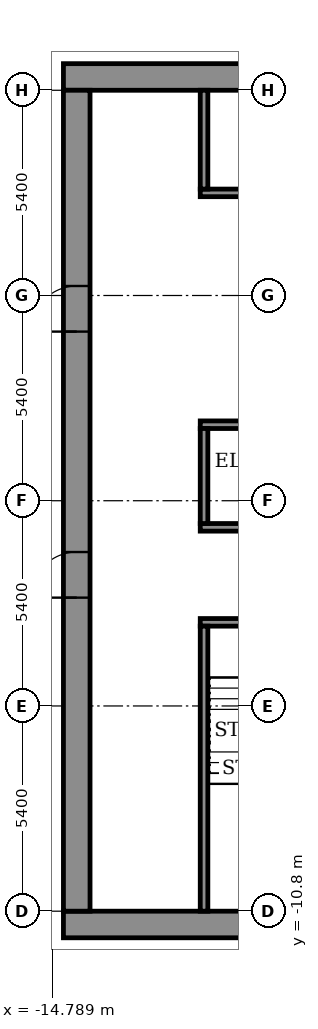
"""IFC4 building model, lengths in metres.
Left out: names, types, materials, properties, quantities, classifications, styles, units other than length and angle.
Written with IfcOpenShell. Run it as: python <this file> out.ifc"""

import sys

from ifc_helpers import new_model, si_unit, direction, frame, frame_2d, origin, place, context, subcontext, project, spatial, rectangle, extrude, element, fill, save


model = new_model("IFC4")
c1 = context("Model", 3, precision=1e-05, world=origin(), true_north=direction((0.0, 1.0)))
c2 = subcontext(c1, "Body", "Model", "MODEL_VIEW")
j1 = project(units=[si_unit("LENGTHUNIT", "METRE"), si_unit("PLANEANGLEUNIT", "RADIAN")], contexts=[c1])
p1 = place(None, origin())
s1 = spatial("IfcSite", under=j1, at=p1, CompositionType="ELEMENT")
p2 = place(p1, origin())
s2 = spatial("IfcBuilding", under=s1, at=p2, CompositionType="ELEMENT")
p3 = place(p2, frame((0.0, 0.0, 297.9)))
s3 = spatial("IfcBuildingStorey", under=s2, at=p3, CompositionType="ELEMENT", Elevation=297.9)
for number, where, z_axis, x_axis in (
    (1, (-14.5, -11.15, 0.0), (0.0, 0.0, 1.0), (1.0, 0.0, 0.0)),
    (2, (-14.5, 11.15, 0.0), (0.0, 0.0, 1.0), (1.0, 0.0, 0.0)),
):
    element("IfcWall", number, at=place(p3, frame(where, z_axis=z_axis, x_axis=x_axis)), inside=s3, PredefinedType="SHEAR", context=c2, shape_type="SweptSolid", body=[
        extrude(rectangle(XDim=29.0, YDim=0.7, at=frame_2d((14.5, 0.0))), origin(), (0.0, 0.0, 1.0), 3.6),
    ])
p4 = place(p3, frame((-14.15, -10.8, 0.0), z_axis=(0.0, 0.0, 1.0), x_axis=(0.0, 1.0, 0.0)))
e3 = element("IfcWall", 3, at=p4, inside=s3, PredefinedType="SHEAR", context=c2, shape_type="SweptSolid", body=[
    extrude(rectangle(XDim=21.6, YDim=0.7, at=frame_2d((10.8, 0.0))), origin(), (0.0, 0.0, 1.0), 3.6),
])
p5 = place(p4, frame((8.25, 0.0, 0.0)))
e4 = element("IfcOpeningElement", 4, at=p5, cuts=e3, PredefinedType="OPENING", context=c2, shape_type="SweptSolid", body=[
    extrude(rectangle(XDim=1.2, YDim=2.1, at=frame_2d((0.6, 1.05))), frame((0.0, 0.36, 0.0), z_axis=(0.0, -1.0, 0.0), x_axis=(1.0, 0.0, 0.0)), (0.0, 0.0, 1.0), 0.72),
])
p6 = place(p4, frame((15.25, 0.0, 0.0)))
e5 = element("IfcOpeningElement", 5, at=p6, cuts=e3, PredefinedType="OPENING", context=c2, shape_type="SweptSolid", body=[
    extrude(rectangle(XDim=1.2, YDim=2.1, at=frame_2d((0.6, 1.05))), frame((0.0, 0.36, 0.0), z_axis=(0.0, -1.0, 0.0), x_axis=(1.0, 0.0, 0.0)), (0.0, 0.0, 1.0), 0.72),
])
p7 = place(p3, frame((-10.9, -3.2, 0.0), z_axis=(0.0, 0.0, 1.0), x_axis=(1.0, 0.0, 0.0)))
e6 = element("IfcWall", 6, at=p7, inside=s3, PredefinedType="SHEAR", context=c2, shape_type="SweptSolid", body=[
    extrude(rectangle(XDim=21.8, YDim=0.2, at=frame_2d((10.9, 0.0))), origin(), (0.0, 0.0, 1.0), 3.05),
])
p8 = place(p7, frame((1.075, 0.0, 0.0)))
e7 = element("IfcOpeningElement", 7, at=p8, cuts=e6, PredefinedType="OPENING", context=c2, shape_type="SweptSolid", body=[
    extrude(rectangle(XDim=1.1, YDim=2.1, at=frame_2d((0.55, 1.05))), frame((0.0, 0.11, 0.0), z_axis=(0.0, -1.0, 0.0), x_axis=(1.0, 0.0, 0.0)), (0.0, 0.0, 1.0), 0.22),
])
p9 = place(p7, frame((10.325, 0.0, 0.0)))
e8 = element("IfcOpeningElement", 8, at=p9, cuts=e6, PredefinedType="OPENING", context=c2, shape_type="SweptSolid", body=[
    extrude(rectangle(XDim=1.1, YDim=2.1, at=frame_2d((0.55, 1.05))), frame((0.0, 0.11, 0.0), z_axis=(0.0, -1.0, 0.0), x_axis=(1.0, 0.0, 0.0)), (0.0, 0.0, 1.0), 0.22),
])
p10 = place(p7, frame((19.625, 0.0, 0.0)))
e9 = element("IfcOpeningElement", 9, at=p10, cuts=e6, PredefinedType="OPENING", context=c2, shape_type="SweptSolid", body=[
    extrude(rectangle(XDim=1.1, YDim=2.1, at=frame_2d((0.55, 1.05))), frame((0.0, 0.11, 0.0), z_axis=(0.0, -1.0, 0.0), x_axis=(1.0, 0.0, 0.0)), (0.0, 0.0, 1.0), 0.22),
])
p11 = place(p7, frame((5.7, 0.0, 0.0)))
e10 = element("IfcOpeningElement", 10, at=p11, cuts=e6, PredefinedType="OPENING", context=c2, shape_type="SweptSolid", body=[
    extrude(rectangle(XDim=1.1, YDim=2.1, at=frame_2d((0.55, 1.05))), frame((0.0, 0.11, 0.0), z_axis=(0.0, -1.0, 0.0), x_axis=(1.0, 0.0, 0.0)), (0.0, 0.0, 1.0), 0.22),
])
p12 = place(p7, frame((14.975, 0.0, 0.0)))
e11 = element("IfcOpeningElement", 11, at=p12, cuts=e6, PredefinedType="OPENING", context=c2, shape_type="SweptSolid", body=[
    extrude(rectangle(XDim=1.1, YDim=2.1, at=frame_2d((0.55, 1.05))), frame((0.0, 0.11, 0.0), z_axis=(0.0, -1.0, 0.0), x_axis=(1.0, 0.0, 0.0)), (0.0, 0.0, 1.0), 0.22),
])
p13 = place(p3, frame((-10.9, -0.7, 0.0), z_axis=(0.0, 0.0, 1.0), x_axis=(1.0, 0.0, 0.0)))
e12 = element("IfcWall", 12, at=p13, inside=s3, PredefinedType="SHEAR", context=c2, shape_type="SweptSolid", body=[
    extrude(rectangle(XDim=21.8, YDim=0.2, at=frame_2d((10.9, 0.0))), origin(), (0.0, 0.0, 1.0), 3.05),
])
p14 = place(p3, frame((-10.9, 2.0, 0.0), z_axis=(0.0, 0.0, 1.0), x_axis=(1.0, 0.0, 0.0)))
e13 = element("IfcWall", 13, at=p14, inside=s3, PredefinedType="SHEAR", context=c2, shape_type="SweptSolid", body=[
    extrude(rectangle(XDim=21.8, YDim=0.2, at=frame_2d((10.9, 0.0))), origin(), (0.0, 0.0, 1.0), 3.05),
])
p15 = place(p14, frame((4.95, 0.0, 0.0)))
e14 = element("IfcOpeningElement", 14, at=p15, cuts=e13, PredefinedType="OPENING", context=c2, shape_type="SweptSolid", body=[
    extrude(rectangle(XDim=1.1, YDim=2.1, at=frame_2d((0.55, 1.05))), frame((0.0, 0.11, 0.0), z_axis=(0.0, -1.0, 0.0), x_axis=(1.0, 0.0, 0.0)), (0.0, 0.0, 1.0), 0.22),
])
p16 = place(p14, frame((7.65, 0.0, 0.0)))
e15 = element("IfcOpeningElement", 15, at=p16, cuts=e13, PredefinedType="OPENING", context=c2, shape_type="SweptSolid", body=[
    extrude(rectangle(XDim=1.1, YDim=2.1, at=frame_2d((0.55, 1.05))), frame((0.0, 0.11, 0.0), z_axis=(0.0, -1.0, 0.0), x_axis=(1.0, 0.0, 0.0)), (0.0, 0.0, 1.0), 0.22),
])
p17 = place(p14, frame((10.35, 0.0, 0.0)))
e16 = element("IfcOpeningElement", 16, at=p17, cuts=e13, PredefinedType="OPENING", context=c2, shape_type="SweptSolid", body=[
    extrude(rectangle(XDim=1.1, YDim=2.1, at=frame_2d((0.55, 1.05))), frame((0.0, 0.11, 0.0), z_axis=(0.0, -1.0, 0.0), x_axis=(1.0, 0.0, 0.0)), (0.0, 0.0, 1.0), 0.22),
])
p18 = place(p14, frame((1.675, 0.0, 0.0)))
e17 = element("IfcOpeningElement", 17, at=p18, cuts=e13, PredefinedType="OPENING", context=c2, shape_type="SweptSolid", body=[
    extrude(rectangle(XDim=0.9, YDim=2.1, at=frame_2d((0.45, 1.05))), frame((0.0, 0.11, 0.0), z_axis=(0.0, -1.0, 0.0), x_axis=(1.0, 0.0, 0.0)), (0.0, 0.0, 1.0), 0.22),
])
p19 = place(p14, frame((16.525, 0.0, 0.0)))
e18 = element("IfcOpeningElement", 18, at=p19, cuts=e13, PredefinedType="OPENING", context=c2, shape_type="SweptSolid", body=[
    extrude(rectangle(XDim=0.9, YDim=2.1, at=frame_2d((0.45, 1.05))), frame((0.0, 0.11, 0.0), z_axis=(0.0, -1.0, 0.0), x_axis=(1.0, 0.0, 0.0)), (0.0, 0.0, 1.0), 0.22),
])
p20 = place(p3, frame((-10.9, 8.1, 0.0), z_axis=(0.0, 0.0, 1.0), x_axis=(1.0, 0.0, 0.0)))
e19 = element("IfcWall", 19, at=p20, inside=s3, PredefinedType="SHEAR", context=c2, shape_type="SweptSolid", body=[
    extrude(rectangle(XDim=21.8, YDim=0.2, at=frame_2d((10.9, 0.0))), origin(), (0.0, 0.0, 1.0), 3.05),
])
p21 = place(p20, frame((4.95, 0.0, 0.0)))
e20 = element("IfcOpeningElement", 20, at=p21, cuts=e19, PredefinedType="OPENING", context=c2, shape_type="SweptSolid", body=[
    extrude(rectangle(XDim=1.1, YDim=2.1, at=frame_2d((0.55, 1.05))), frame((0.0, 0.11, 0.0), z_axis=(0.0, -1.0, 0.0), x_axis=(1.0, 0.0, 0.0)), (0.0, 0.0, 1.0), 0.22),
])
p22 = place(p20, frame((7.65, 0.0, 0.0)))
e21 = element("IfcOpeningElement", 21, at=p22, cuts=e19, PredefinedType="OPENING", context=c2, shape_type="SweptSolid", body=[
    extrude(rectangle(XDim=1.1, YDim=2.1, at=frame_2d((0.55, 1.05))), frame((0.0, 0.11, 0.0), z_axis=(0.0, -1.0, 0.0), x_axis=(1.0, 0.0, 0.0)), (0.0, 0.0, 1.0), 0.22),
])
p23 = place(p20, frame((10.35, 0.0, 0.0)))
e22 = element("IfcOpeningElement", 22, at=p23, cuts=e19, PredefinedType="OPENING", context=c2, shape_type="SweptSolid", body=[
    extrude(rectangle(XDim=1.1, YDim=2.1, at=frame_2d((0.55, 1.05))), frame((0.0, 0.11, 0.0), z_axis=(0.0, -1.0, 0.0), x_axis=(1.0, 0.0, 0.0)), (0.0, 0.0, 1.0), 0.22),
])
p24 = place(p20, frame((1.675, 0.0, 0.0)))
e23 = element("IfcOpeningElement", 23, at=p24, cuts=e19, PredefinedType="OPENING", context=c2, shape_type="SweptSolid", body=[
    extrude(rectangle(XDim=0.9, YDim=2.1, at=frame_2d((0.45, 1.05))), frame((0.0, 0.11, 0.0), z_axis=(0.0, -1.0, 0.0), x_axis=(1.0, 0.0, 0.0)), (0.0, 0.0, 1.0), 0.22),
])
p25 = place(p20, frame((13.825, 0.0, 0.0)))
e24 = element("IfcOpeningElement", 24, at=p25, cuts=e19, PredefinedType="OPENING", context=c2, shape_type="SweptSolid", body=[
    extrude(rectangle(XDim=0.9, YDim=2.1, at=frame_2d((0.45, 1.05))), frame((0.0, 0.11, 0.0), z_axis=(0.0, -1.0, 0.0), x_axis=(1.0, 0.0, 0.0)), (0.0, 0.0, 1.0), 0.22),
])
p26 = place(p20, frame((18.55, 0.0, 0.0)))
e25 = element("IfcOpeningElement", 25, at=p26, cuts=e19, PredefinedType="OPENING", context=c2, shape_type="SweptSolid", body=[
    extrude(rectangle(XDim=0.9, YDim=2.1, at=frame_2d((0.45, 1.05))), frame((0.0, 0.11, 0.0), z_axis=(0.0, -1.0, 0.0), x_axis=(1.0, 0.0, 0.0)), (0.0, 0.0, 1.0), 0.22),
])
p27 = place(p3, frame((-10.8, -10.8, 0.0), z_axis=(0.0, 0.0, 1.0), x_axis=(0.0, 1.0, 0.0)))
e26 = element("IfcWall", 26, at=p27, inside=s3, PredefinedType="SHEAR", context=c2, shape_type="SweptSolid", body=[
    extrude(rectangle(XDim=7.5, YDim=0.2, at=frame_2d((3.75, 0.0))), origin(), (0.0, 0.0, 1.0), 3.05),
])
p28 = place(p3, frame((-10.8, -0.6, 0.0), z_axis=(0.0, 0.0, 1.0), x_axis=(0.0, 1.0, 0.0)))
e27 = element("IfcWall", 27, at=p28, inside=s3, PredefinedType="STANDARD", context=c2, shape_type="SweptSolid", body=[
    extrude(rectangle(XDim=2.5, YDim=0.2, at=frame_2d((1.25, 0.0))), origin(), (0.0, 0.0, 1.0), 3.05),
])
p29 = place(p3, frame((-10.8, 8.2, 0.0), z_axis=(0.0, 0.0, 1.0), x_axis=(0.0, 1.0, 0.0)))
e28 = element("IfcWall", 28, at=p29, inside=s3, PredefinedType="STANDARD", context=c2, shape_type="SweptSolid", body=[
    extrude(rectangle(XDim=2.6, YDim=0.2, at=frame_2d((1.3, 0.0))), origin(), (0.0, 0.0, 1.0), 3.05),
])
p30 = place(p5, origin())
e29 = element("IfcDoor", 29, at=p30, inside=s3, OperationType="DOUBLE_DOOR_SINGLE_SWING", PredefinedType="DOOR", context=c2, shape_type="SweptSolid", body=[
    extrude(rectangle(XDim=1.2, YDim=2.1, at=frame_2d((0.6, 1.05))), frame((0.0, 0.025, 0.0), z_axis=(0.0, -1.0, 0.0), x_axis=(1.0, 0.0, 0.0)), (0.0, 0.0, 1.0), 0.05),
])
fill(e4, e29)
p31 = place(p6, origin())
e30 = element("IfcDoor", 30, at=p31, inside=s3, OperationType="DOUBLE_DOOR_SINGLE_SWING", PredefinedType="DOOR", context=c2, shape_type="SweptSolid", body=[
    extrude(rectangle(XDim=1.2, YDim=2.1, at=frame_2d((0.6, 1.05))), frame((0.0, 0.025, 0.0), z_axis=(0.0, -1.0, 0.0), x_axis=(1.0, 0.0, 0.0)), (0.0, 0.0, 1.0), 0.05),
])
fill(e5, e30)
save(model, sys.argv[1])
